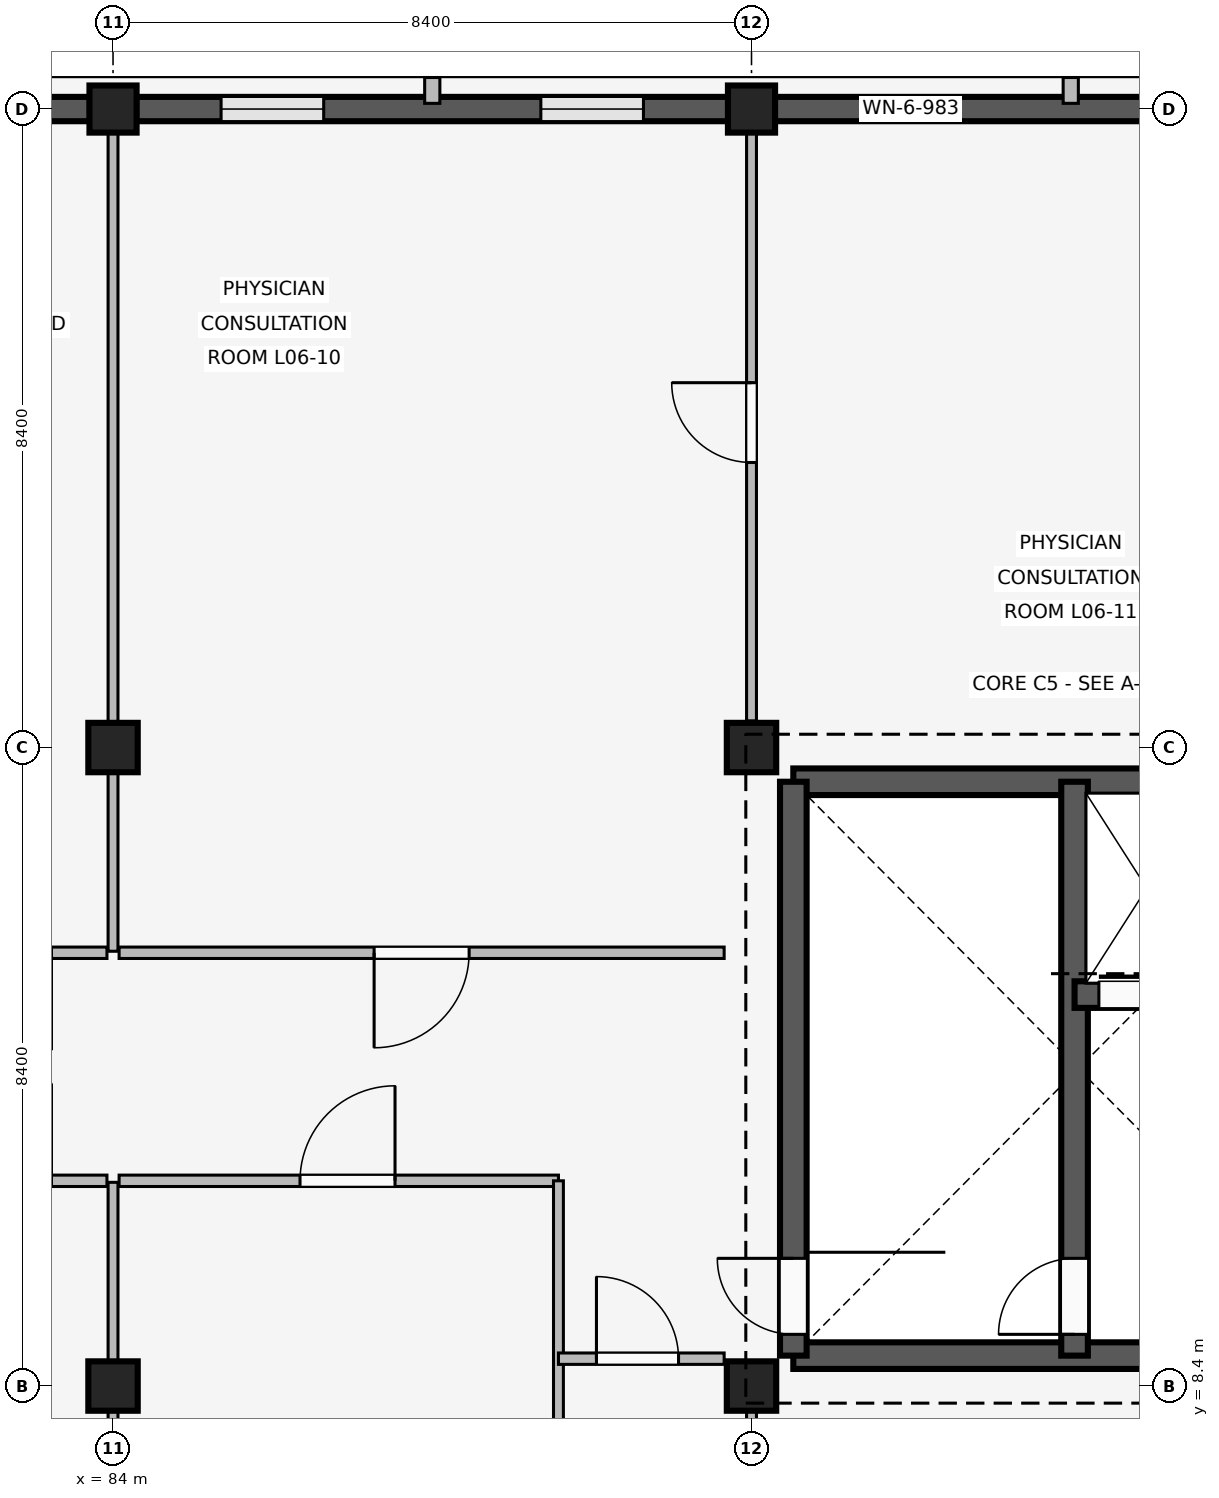
"""IFC4 building model, lengths in metres.
Left out: names, types, materials, properties, quantities, classifications, styles, units other than length and angle.
Written with IfcOpenShell. Run it as: python <this file> out.ifc"""

import sys

from ifc_helpers import new_model, si_unit, direction, frame, frame_2d, origin, origin_2d, place, context, subcontext, project, spatial, rectangle, extrude, element, fill, save


model = new_model("IFC4")
c1 = context("Model", 3, precision=1e-05, world=origin(), true_north=direction((0.0, 1.0)))
c2 = subcontext(c1, "Body", "Model", "MODEL_VIEW")
j1 = project(units=[si_unit("LENGTHUNIT", "METRE"), si_unit("PLANEANGLEUNIT", "RADIAN")], contexts=[c1])
p1 = place(None, origin())
s1 = spatial("IfcSite", under=j1, at=p1, CompositionType="ELEMENT")
p2 = place(p1, origin())
s2 = spatial("IfcBuilding", under=s1, at=p2, CompositionType="ELEMENT")
p3 = place(p2, frame((0.0, 0.0, 24.6)))
s3 = spatial("IfcBuildingStorey", under=s2, at=p3, CompositionType="ELEMENT", Elevation=24.6)
for number, where, z_axis, x_axis in (
    (1, (84.0, 8.4, 0.0), (0.0, 0.0, 1.0), (1.0, 0.0, 0.0)),
    (2, (84.0, 16.8, 0.0), (0.0, 0.0, 1.0), (1.0, 0.0, 0.0)),
):
    element("IfcColumn", number, at=place(p3, frame(where, z_axis=z_axis, x_axis=x_axis)), inside=s3, PredefinedType="COLUMN", context=c2, shape_type="SweptSolid", body=[
        extrude(rectangle(XDim=0.65, YDim=0.65, at=origin_2d()), origin(), (0.0, 0.0, 1.0), 4.2),
    ])
p4 = place(p3, frame((84.0, 25.2, 0.0), z_axis=(0.0, 0.0, 1.0), x_axis=(1.0, 0.0, 0.0)))
e3 = element("IfcColumn", 3, at=p4, inside=s3, PredefinedType="COLUMN", context=c2, shape_type="SweptSolid", body=[
    extrude(rectangle(XDim=0.62, YDim=0.62, at=origin_2d()), origin(), (0.0, 0.0, 1.0), 4.2),
])
for number, where, z_axis, x_axis in (
    (4, (92.4, 8.4, 0.0), (0.0, 0.0, 1.0), (1.0, 0.0, 0.0)),
    (5, (92.4, 16.8, 0.0), (0.0, 0.0, 1.0), (1.0, 0.0, 0.0)),
):
    element("IfcColumn", number, at=place(p3, frame(where, z_axis=z_axis, x_axis=x_axis)), inside=s3, PredefinedType="COLUMN", context=c2, shape_type="SweptSolid", body=[
        extrude(rectangle(XDim=0.65, YDim=0.65, at=origin_2d()), origin(), (0.0, 0.0, 1.0), 4.2),
    ])
p5 = place(p3, frame((92.4, 25.2, 0.0), z_axis=(0.0, 0.0, 1.0), x_axis=(1.0, 0.0, 0.0)))
e6 = element("IfcColumn", 6, at=p5, inside=s3, PredefinedType="COLUMN", context=c2, shape_type="SweptSolid", body=[
    extrude(rectangle(XDim=0.62, YDim=0.62, at=origin_2d()), origin(), (0.0, 0.0, 1.0), 4.2),
])
p6 = place(p3, frame((75.905, 25.2, 0.0), z_axis=(0.0, 0.0, 1.0), x_axis=(1.0, 0.0, 0.0)))
e7 = element("IfcWall", 7, at=p6, inside=s3, PredefinedType="SOLIDWALL", context=c2, shape_type="SweptSolid", body=[
    extrude(rectangle(XDim=7.79, YDim=0.32, at=frame_2d((3.895, 0.0))), origin(), (0.0, 0.0, 1.0), 3.34),
])
p7 = place(p6, frame((1.032, 0.0, 0.85)))
e8 = element("IfcOpeningElement", 8, at=p7, cuts=e7, PredefinedType="OPENING", context=c2, shape_type="SweptSolid", body=[
    extrude(rectangle(XDim=1.52, YDim=1.65, at=frame_2d((0.76, 0.825))), frame((0.0, 0.17, 0.0), z_axis=(0.0, -1.0, 0.0), x_axis=(1.0, 0.0, 0.0)), (0.0, 0.0, 1.0), 0.34),
])
p8 = place(p6, frame((5.238, 0.0, 0.85)))
e9 = element("IfcOpeningElement", 9, at=p8, cuts=e7, PredefinedType="OPENING", context=c2, shape_type="SweptSolid", body=[
    extrude(rectangle(XDim=1.52, YDim=1.65, at=frame_2d((0.76, 0.825))), frame((0.0, 0.17, 0.0), z_axis=(0.0, -1.0, 0.0), x_axis=(1.0, 0.0, 0.0)), (0.0, 0.0, 1.0), 0.34),
])
p9 = place(p3, frame((84.305, 25.2, 0.0), z_axis=(0.0, 0.0, 1.0), x_axis=(1.0, 0.0, 0.0)))
e10 = element("IfcWall", 10, at=p9, inside=s3, PredefinedType="SOLIDWALL", context=c2, shape_type="SweptSolid", body=[
    extrude(rectangle(XDim=7.79, YDim=0.32, at=frame_2d((3.895, 0.0))), origin(), (0.0, 0.0, 1.0), 3.34),
])
p10 = place(p9, frame((1.117, 0.0, 0.85)))
e11 = element("IfcOpeningElement", 11, at=p10, cuts=e10, PredefinedType="OPENING", context=c2, shape_type="SweptSolid", body=[
    extrude(rectangle(XDim=1.35, YDim=1.55, at=frame_2d((0.675, 0.775))), frame((0.0, 0.17, 0.0), z_axis=(0.0, -1.0, 0.0), x_axis=(1.0, 0.0, 0.0)), (0.0, 0.0, 1.0), 0.34),
])
p11 = place(p9, frame((5.323, 0.0, 0.85)))
e12 = element("IfcOpeningElement", 12, at=p11, cuts=e10, PredefinedType="OPENING", context=c2, shape_type="SweptSolid", body=[
    extrude(rectangle(XDim=1.35, YDim=1.55, at=frame_2d((0.675, 0.775))), frame((0.0, 0.17, 0.0), z_axis=(0.0, -1.0, 0.0), x_axis=(1.0, 0.0, 0.0)), (0.0, 0.0, 1.0), 0.34),
])
p12 = place(p3, frame((88.2, 25.275, 0.0), z_axis=(0.0, 0.0, 1.0), x_axis=(0.0, 1.0, 0.0)))
e13 = element("IfcWall", 13, at=p12, inside=s3, PredefinedType="ELEMENTEDWALL", context=c2, shape_type="SweptSolid", body=[
    extrude(rectangle(XDim=0.34, YDim=0.2, at=frame_2d((0.17, 0.0))), origin(), (0.0, 0.0, 1.0), 3.32),
])
p13 = place(p3, frame((92.705, 25.2, 0.0), z_axis=(0.0, 0.0, 1.0), x_axis=(1.0, 0.0, 0.0)))
e14 = element("IfcWall", 14, at=p13, inside=s3, PredefinedType="SOLIDWALL", context=c2, shape_type="SweptSolid", body=[
    extrude(rectangle(XDim=7.79, YDim=0.32, at=frame_2d((3.895, 0.0))), origin(), (0.0, 0.0, 1.0), 3.34),
])
p14 = place(p13, frame((1.192, 0.0, 0.85)))
e15 = element("IfcOpeningElement", 15, at=p14, cuts=e14, PredefinedType="OPENING", context=c2, shape_type="SweptSolid", body=[
    extrude(rectangle(XDim=1.2, YDim=1.55, at=frame_2d((0.6, 0.775))), frame((0.0, 0.17, 0.0), z_axis=(0.0, -1.0, 0.0), x_axis=(1.0, 0.0, 0.0)), (0.0, 0.0, 1.0), 0.34),
])
p15 = place(p13, frame((5.398, 0.0, 0.85)))
e16 = element("IfcOpeningElement", 16, at=p15, cuts=e14, PredefinedType="OPENING", context=c2, shape_type="SweptSolid", body=[
    extrude(rectangle(XDim=1.2, YDim=1.55, at=frame_2d((0.6, 0.775))), frame((0.0, 0.17, 0.0), z_axis=(0.0, -1.0, 0.0), x_axis=(1.0, 0.0, 0.0)), (0.0, 0.0, 1.0), 0.34),
])
p16 = place(p3, frame((96.6, 25.275, 0.0), z_axis=(0.0, 0.0, 1.0), x_axis=(0.0, 1.0, 0.0)))
e17 = element("IfcWall", 17, at=p16, inside=s3, PredefinedType="ELEMENTEDWALL", context=c2, shape_type="SweptSolid", body=[
    extrude(rectangle(XDim=0.34, YDim=0.2, at=frame_2d((0.17, 0.0))), origin(), (0.0, 0.0, 1.0), 3.32),
])
p17 = place(p3, frame((92.95, 8.8, 0.0), z_axis=(0.0, 0.0, 1.0), x_axis=(1.0, 0.0, 0.0)))
e18 = element("IfcWall", 18, at=p17, inside=s3, PredefinedType="SHEAR", context=c2, shape_type="SweptSolid", body=[
    extrude(rectangle(XDim=7.5, YDim=0.35, at=frame_2d((3.75, 0.0))), origin(), (0.0, 0.0, 1.0), 3.92),
])
p18 = place(p17, frame((4.85, 0.0, 0.0)))
e19 = element("IfcOpeningElement", 19, at=p18, cuts=e18, PredefinedType="OPENING", context=c2, shape_type="SweptSolid", body=[
    extrude(rectangle(XDim=1.2, YDim=2.2, at=frame_2d((0.6, 1.1))), frame((0.0, 0.185, 0.0), z_axis=(0.0, -1.0, 0.0), x_axis=(1.0, 0.0, 0.0)), (0.0, 0.0, 1.0), 0.37),
])
p19 = place(p3, frame((92.95, 16.35, 0.0), z_axis=(0.0, 0.0, 1.0), x_axis=(1.0, 0.0, 0.0)))
e20 = element("IfcWall", 20, at=p19, inside=s3, PredefinedType="SHEAR", context=c2, shape_type="SweptSolid", body=[
    extrude(rectangle(XDim=7.5, YDim=0.35, at=frame_2d((3.75, 0.0))), origin(), (0.0, 0.0, 1.0), 3.92),
])
p20 = place(p3, frame((92.95, 8.8, 0.0), z_axis=(0.0, 0.0, 1.0), x_axis=(0.0, 1.0, 0.0)))
e21 = element("IfcWall", 21, at=p20, inside=s3, PredefinedType="SHEAR", context=c2, shape_type="SweptSolid", body=[
    extrude(rectangle(XDim=7.55, YDim=0.35, at=frame_2d((3.775, 0.0))), origin(), (0.0, 0.0, 1.0), 3.92),
])
p21 = place(p20, frame((0.28, 0.0, 0.0)))
e22 = element("IfcOpeningElement", 22, at=p21, cuts=e21, PredefinedType="OPENING", context=c2, shape_type="SweptSolid", body=[
    extrude(rectangle(XDim=1.0, YDim=2.15, at=frame_2d((0.5, 1.075))), frame((0.0, 0.185, 0.0), z_axis=(0.0, -1.0, 0.0), x_axis=(1.0, 0.0, 0.0)), (0.0, 0.0, 1.0), 0.37),
])
p22 = place(p3, frame((96.65, 8.8, 0.0), z_axis=(0.0, 0.0, 1.0), x_axis=(0.0, 1.0, 0.0)))
e23 = element("IfcWall", 23, at=p22, inside=s3, PredefinedType="SHEAR", context=c2, shape_type="SweptSolid", body=[
    extrude(rectangle(XDim=7.55, YDim=0.35, at=frame_2d((3.775, 0.0))), origin(), (0.0, 0.0, 1.0), 3.92),
])
p23 = place(p22, frame((0.28, 0.0, 0.0)))
e24 = element("IfcOpeningElement", 24, at=p23, cuts=e23, PredefinedType="OPENING", context=c2, shape_type="SweptSolid", body=[
    extrude(rectangle(XDim=1.0, YDim=2.15, at=frame_2d((0.5, 1.075))), frame((0.0, 0.185, 0.0), z_axis=(0.0, -1.0, 0.0), x_axis=(1.0, 0.0, 0.0)), (0.0, 0.0, 1.0), 0.37),
])
p24 = place(p3, frame((96.65, 13.55, 0.0), z_axis=(0.0, 0.0, 1.0), x_axis=(1.0, 0.0, 0.0)))
e25 = element("IfcWall", 25, at=p24, inside=s3, PredefinedType="SHEAR", context=c2, shape_type="SweptSolid", body=[
    extrude(rectangle(XDim=3.8, YDim=0.35, at=frame_2d((1.9, 0.0))), origin(), (0.0, 0.0, 1.0), 3.92),
])
p25 = place(p24, frame((0.32, 0.0, 0.0)))
e26 = element("IfcOpeningElement", 26, at=p25, cuts=e25, PredefinedType="OPENING", context=c2, shape_type="SweptSolid", body=[
    extrude(rectangle(XDim=1.4, YDim=2.25, at=frame_2d((0.7, 1.125))), frame((0.0, 0.185, 0.0), z_axis=(0.0, -1.0, 0.0), x_axis=(1.0, 0.0, 0.0)), (0.0, 0.0, 1.0), 0.37),
])
p26 = place(p24, frame((2.04, 0.0, 0.0)))
e27 = element("IfcOpeningElement", 27, at=p26, cuts=e25, PredefinedType="OPENING", context=c2, shape_type="SweptSolid", body=[
    extrude(rectangle(XDim=1.1, YDim=2.15, at=frame_2d((0.55, 1.075))), frame((0.0, 0.185, 0.0), z_axis=(0.0, -1.0, 0.0), x_axis=(1.0, 0.0, 0.0)), (0.0, 0.0, 1.0), 0.37),
])
p27 = place(p3, frame((75.68, 11.1, 0.0), z_axis=(0.0, 0.0, 1.0), x_axis=(1.0, 0.0, 0.0)))
e28 = element("IfcWall", 28, at=p27, inside=s3, PredefinedType="PARTITIONING", context=c2, shape_type="SweptSolid", body=[
    extrude(rectangle(XDim=8.24, YDim=0.15, at=frame_2d((4.12, 0.0))), origin(), (0.0, 0.0, 1.0), 3.32),
])
p28 = place(p27, frame((2.53, 0.0, 0.0)))
e29 = element("IfcOpeningElement", 29, at=p28, cuts=e28, PredefinedType="OPENING", context=c2, shape_type="SweptSolid", body=[
    extrude(rectangle(XDim=1.28, YDim=2.2, at=frame_2d((0.64, 1.1))), frame((0.0, 0.085, 0.0), z_axis=(0.0, -1.0, 0.0), x_axis=(1.0, 0.0, 0.0)), (0.0, 0.0, 1.0), 0.17),
])
p29 = place(p27, frame((6.23, 0.0, 0.0)))
e30 = element("IfcOpeningElement", 30, at=p29, cuts=e28, PredefinedType="OPENING", context=c2, shape_type="SweptSolid", body=[
    extrude(rectangle(XDim=1.28, YDim=2.2, at=frame_2d((0.64, 1.1))), frame((0.0, 0.085, 0.0), z_axis=(0.0, -1.0, 0.0), x_axis=(1.0, 0.0, 0.0)), (0.0, 0.0, 1.0), 0.17),
])
p30 = place(p3, frame((83.92, 14.1, 0.0), z_axis=(0.0, 0.0, 1.0), x_axis=(-1.0, 0.0, 0.0)))
e31 = element("IfcWall", 31, at=p30, inside=s3, PredefinedType="PARTITIONING", context=c2, shape_type="SweptSolid", body=[
    extrude(rectangle(XDim=8.24, YDim=0.15, at=frame_2d((4.12, 0.0))), origin(), (0.0, 0.0, 1.0), 3.32),
])
p31 = place(p30, frame((0.73, 0.0, 0.0)))
e32 = element("IfcOpeningElement", 32, at=p31, cuts=e31, PredefinedType="OPENING", context=c2, shape_type="SweptSolid", body=[
    extrude(rectangle(XDim=1.28, YDim=2.2, at=frame_2d((0.64, 1.1))), frame((0.0, 0.085, 0.0), z_axis=(0.0, -1.0, 0.0), x_axis=(1.0, 0.0, 0.0)), (0.0, 0.0, 1.0), 0.17),
])
p32 = place(p30, frame((4.43, 0.0, 0.0)))
e33 = element("IfcOpeningElement", 33, at=p32, cuts=e31, PredefinedType="OPENING", context=c2, shape_type="SweptSolid", body=[
    extrude(rectangle(XDim=1.28, YDim=2.2, at=frame_2d((0.64, 1.1))), frame((0.0, 0.085, 0.0), z_axis=(0.0, -1.0, 0.0), x_axis=(1.0, 0.0, 0.0)), (0.0, 0.0, 1.0), 0.17),
])
p33 = place(p3, frame((84.0, 0.14, 0.0), z_axis=(0.0, 0.0, 1.0), x_axis=(0.0, 1.0, 0.0)))
e34 = element("IfcWall", 34, at=p33, inside=s3, PredefinedType="PARTITIONING", context=c2, shape_type="SweptSolid", body=[
    extrude(rectangle(XDim=10.94, YDim=0.13, at=frame_2d((5.47, 0.0))), origin(), (0.0, 0.0, 1.0), 3.32),
])
p34 = place(p3, frame((84.0, 14.12, 0.0), z_axis=(0.0, 0.0, 1.0), x_axis=(0.0, 1.0, 0.0)))
e35 = element("IfcWall", 35, at=p34, inside=s3, PredefinedType="PARTITIONING", context=c2, shape_type="SweptSolid", body=[
    extrude(rectangle(XDim=10.94, YDim=0.13, at=frame_2d((5.47, 0.0))), origin(), (0.0, 0.0, 1.0), 3.32),
])
p35 = place(p3, frame((84.08, 11.1, 0.0), z_axis=(0.0, 0.0, 1.0), x_axis=(1.0, 0.0, 0.0)))
e36 = element("IfcWall", 36, at=p35, inside=s3, PredefinedType="PARTITIONING", context=c2, shape_type="SweptSolid", body=[
    extrude(rectangle(XDim=5.78, YDim=0.15, at=frame_2d((2.89, 0.0))), origin(), (0.0, 0.0, 1.0), 3.32),
])
p36 = place(p35, frame((2.38, 0.0, 0.0)))
e37 = element("IfcOpeningElement", 37, at=p36, cuts=e36, PredefinedType="OPENING", context=c2, shape_type="SweptSolid", body=[
    extrude(rectangle(XDim=1.25, YDim=2.2, at=frame_2d((0.625, 1.1))), frame((0.0, 0.085, 0.0), z_axis=(0.0, -1.0, 0.0), x_axis=(1.0, 0.0, 0.0)), (0.0, 0.0, 1.0), 0.17),
])
p37 = place(p3, frame((89.86, 0.16, 0.0), z_axis=(0.0, 0.0, 1.0), x_axis=(0.0, 1.0, 0.0)))
e38 = element("IfcWall", 38, at=p37, inside=s3, PredefinedType="PARTITIONING", context=c2, shape_type="SweptSolid", body=[
    extrude(rectangle(XDim=10.94, YDim=0.13, at=frame_2d((5.47, 0.0))), origin(), (0.0, 0.0, 1.0), 3.32),
])
p38 = place(p3, frame((89.86, 8.76, 0.0), z_axis=(0.0, 0.0, 1.0), x_axis=(1.0, 0.0, 0.0)))
e39 = element("IfcWall", 39, at=p38, inside=s3, PredefinedType="PARTITIONING", context=c2, shape_type="SweptSolid", body=[
    extrude(rectangle(XDim=2.18, YDim=0.15, at=frame_2d((1.09, 0.0))), origin(), (0.0, 0.0, 1.0), 3.32),
])
p39 = place(p38, frame((0.5, 0.0, 0.0)))
e40 = element("IfcOpeningElement", 40, at=p39, cuts=e39, PredefinedType="OPENING", context=c2, shape_type="SweptSolid", body=[
    extrude(rectangle(XDim=1.08, YDim=2.15, at=frame_2d((0.54, 1.075))), frame((0.0, 0.085, 0.0), z_axis=(0.0, -1.0, 0.0), x_axis=(1.0, 0.0, 0.0)), (0.0, 0.0, 1.0), 0.17),
])
p40 = place(p3, frame((92.04, 14.1, 0.0), z_axis=(0.0, 0.0, 1.0), x_axis=(-1.0, 0.0, 0.0)))
e41 = element("IfcWall", 41, at=p40, inside=s3, PredefinedType="PARTITIONING", context=c2, shape_type="SweptSolid", body=[
    extrude(rectangle(XDim=7.96, YDim=0.15, at=frame_2d((3.98, 0.0))), origin(), (0.0, 0.0, 1.0), 3.32),
])
p41 = place(p40, frame((3.355, 0.0, 0.0)))
e42 = element("IfcOpeningElement", 42, at=p41, cuts=e41, PredefinedType="OPENING", context=c2, shape_type="SweptSolid", body=[
    extrude(rectangle(XDim=1.25, YDim=2.2, at=frame_2d((0.625, 1.1))), frame((0.0, 0.085, 0.0), z_axis=(0.0, -1.0, 0.0), x_axis=(1.0, 0.0, 0.0)), (0.0, 0.0, 1.0), 0.17),
])
p42 = place(p3, frame((92.4, 0.14, 0.0), z_axis=(0.0, 0.0, 1.0), x_axis=(0.0, 1.0, 0.0)))
e43 = element("IfcWall", 43, at=p42, inside=s3, PredefinedType="PARTITIONING", context=c2, shape_type="SweptSolid", body=[
    extrude(rectangle(XDim=8.21, YDim=0.13, at=frame_2d((4.105, 0.0))), origin(), (0.0, 0.0, 1.0), 3.32),
])
p43 = place(p42, frame((3.64, 0.0, 0.0)))
e44 = element("IfcOpeningElement", 44, at=p43, cuts=e43, PredefinedType="OPENING", context=c2, shape_type="SweptSolid", body=[
    extrude(rectangle(XDim=1.08, YDim=2.15, at=frame_2d((0.54, 1.075))), frame((0.0, 0.075, 0.0), z_axis=(0.0, -1.0, 0.0), x_axis=(1.0, 0.0, 0.0)), (0.0, 0.0, 1.0), 0.15),
])
p44 = place(p3, frame((92.4, 17.15, 0.0), z_axis=(0.0, 0.0, 1.0), x_axis=(0.0, 1.0, 0.0)))
e45 = element("IfcWall", 45, at=p44, inside=s3, PredefinedType="PARTITIONING", context=c2, shape_type="SweptSolid", body=[
    extrude(rectangle(XDim=7.91, YDim=0.13, at=frame_2d((3.955, 0.0))), origin(), (0.0, 0.0, 1.0), 3.32),
])
p45 = place(p44, frame((3.4, 0.0, 0.0)))
e46 = element("IfcOpeningElement", 46, at=p45, cuts=e45, PredefinedType="OPENING", context=c2, shape_type="SweptSolid", body=[
    extrude(rectangle(XDim=1.05, YDim=2.2, at=frame_2d((0.525, 1.1))), frame((0.0, 0.075, 0.0), z_axis=(0.0, -1.0, 0.0), x_axis=(1.0, 0.0, 0.0)), (0.0, 0.0, 1.0), 0.15),
])
p46 = place(p10, origin())
e47 = element("IfcWindow", 47, at=p46, inside=s3, PartitioningType="SINGLE_PANEL", PredefinedType="WINDOW", context=c2, shape_type="SweptSolid", body=[
    extrude(rectangle(XDim=1.35, YDim=1.55, at=frame_2d((0.675, 0.775))), frame((0.0, 0.03, 0.0), z_axis=(0.0, -1.0, 0.0), x_axis=(1.0, 0.0, 0.0)), (0.0, 0.0, 1.0), 0.06),
])
fill(e11, e47)
p47 = place(p11, origin())
e48 = element("IfcWindow", 48, at=p47, inside=s3, PartitioningType="SINGLE_PANEL", PredefinedType="WINDOW", context=c2, shape_type="SweptSolid", body=[
    extrude(rectangle(XDim=1.35, YDim=1.55, at=frame_2d((0.675, 0.775))), frame((0.0, 0.03, 0.0), z_axis=(0.0, -1.0, 0.0), x_axis=(1.0, 0.0, 0.0)), (0.0, 0.0, 1.0), 0.06),
])
fill(e12, e48)
p48 = place(p14, origin())
e49 = element("IfcWindow", 49, at=p48, inside=s3, PartitioningType="SINGLE_PANEL", PredefinedType="WINDOW", context=c2, shape_type="SweptSolid", body=[
    extrude(rectangle(XDim=1.2, YDim=1.55, at=frame_2d((0.6, 0.775))), frame((0.0, 0.03, 0.0), z_axis=(0.0, -1.0, 0.0), x_axis=(1.0, 0.0, 0.0)), (0.0, 0.0, 1.0), 0.06),
])
fill(e15, e49)
p49 = place(p21, origin())
e50 = element("IfcDoor", 50, at=p49, inside=s3, OperationType="SINGLE_SWING_RIGHT", PredefinedType="DOOR", context=c2, shape_type="SweptSolid", body=[
    extrude(rectangle(XDim=1.0, YDim=2.15, at=frame_2d((0.5, 1.075))), frame((0.0, 0.025, 0.0), z_axis=(0.0, -1.0, 0.0), x_axis=(1.0, 0.0, 0.0)), (0.0, 0.0, 1.0), 0.05),
])
fill(e22, e50)
p50 = place(p23, origin())
e51 = element("IfcDoor", 51, at=p50, inside=s3, OperationType="SINGLE_SWING_LEFT", PredefinedType="DOOR", context=c2, shape_type="SweptSolid", body=[
    extrude(rectangle(XDim=1.0, YDim=2.15, at=frame_2d((0.5, 1.075))), frame((0.0, 0.025, 0.0), z_axis=(0.0, -1.0, 0.0), x_axis=(1.0, 0.0, 0.0)), (0.0, 0.0, 1.0), 0.05),
])
fill(e24, e51)
p51 = place(p25, origin())
e52 = element("IfcDoor", 52, at=p51, inside=s3, OperationType="SLIDING_TO_LEFT", PredefinedType="DOOR", context=c2, shape_type="SweptSolid", body=[
    extrude(rectangle(XDim=1.4, YDim=2.25, at=frame_2d((0.7, 1.125))), frame((0.0, 0.025, 0.0), z_axis=(0.0, -1.0, 0.0), x_axis=(1.0, 0.0, 0.0)), (0.0, 0.0, 1.0), 0.05),
])
fill(e26, e52)
p52 = place(p36, origin())
e53 = element("IfcDoor", 53, at=p52, inside=s3, OperationType="SINGLE_SWING_RIGHT", PredefinedType="DOOR", context=c2, shape_type="SweptSolid", body=[
    extrude(rectangle(XDim=1.25, YDim=2.2, at=frame_2d((0.625, 1.1))), frame((0.0, 0.025, 0.0), z_axis=(0.0, -1.0, 0.0), x_axis=(1.0, 0.0, 0.0)), (0.0, 0.0, 1.0), 0.05),
])
fill(e37, e53)
p53 = place(p39, origin())
e54 = element("IfcDoor", 54, at=p53, inside=s3, OperationType="SINGLE_SWING_LEFT", PredefinedType="DOOR", context=c2, shape_type="SweptSolid", body=[
    extrude(rectangle(XDim=1.08, YDim=2.15, at=frame_2d((0.54, 1.075))), frame((0.0, 0.025, 0.0), z_axis=(0.0, -1.0, 0.0), x_axis=(1.0, 0.0, 0.0)), (0.0, 0.0, 1.0), 0.05),
])
fill(e40, e54)
p54 = place(p41, origin())
e55 = element("IfcDoor", 55, at=p54, inside=s3, OperationType="SINGLE_SWING_RIGHT", PredefinedType="DOOR", context=c2, shape_type="SweptSolid", body=[
    extrude(rectangle(XDim=1.25, YDim=2.2, at=frame_2d((0.625, 1.1))), frame((0.0, 0.025, 0.0), z_axis=(0.0, -1.0, 0.0), x_axis=(1.0, 0.0, 0.0)), (0.0, 0.0, 1.0), 0.05),
])
fill(e42, e55)
p55 = place(p45, origin())
e56 = element("IfcDoor", 56, at=p55, inside=s3, OperationType="SINGLE_SWING_RIGHT", PredefinedType="DOOR", context=c2, shape_type="SweptSolid", body=[
    extrude(rectangle(XDim=1.05, YDim=2.2, at=frame_2d((0.525, 1.1))), frame((0.0, 0.025, 0.0), z_axis=(0.0, -1.0, 0.0), x_axis=(1.0, 0.0, 0.0)), (0.0, 0.0, 1.0), 0.05),
])
fill(e46, e56)
save(model, sys.argv[1])
